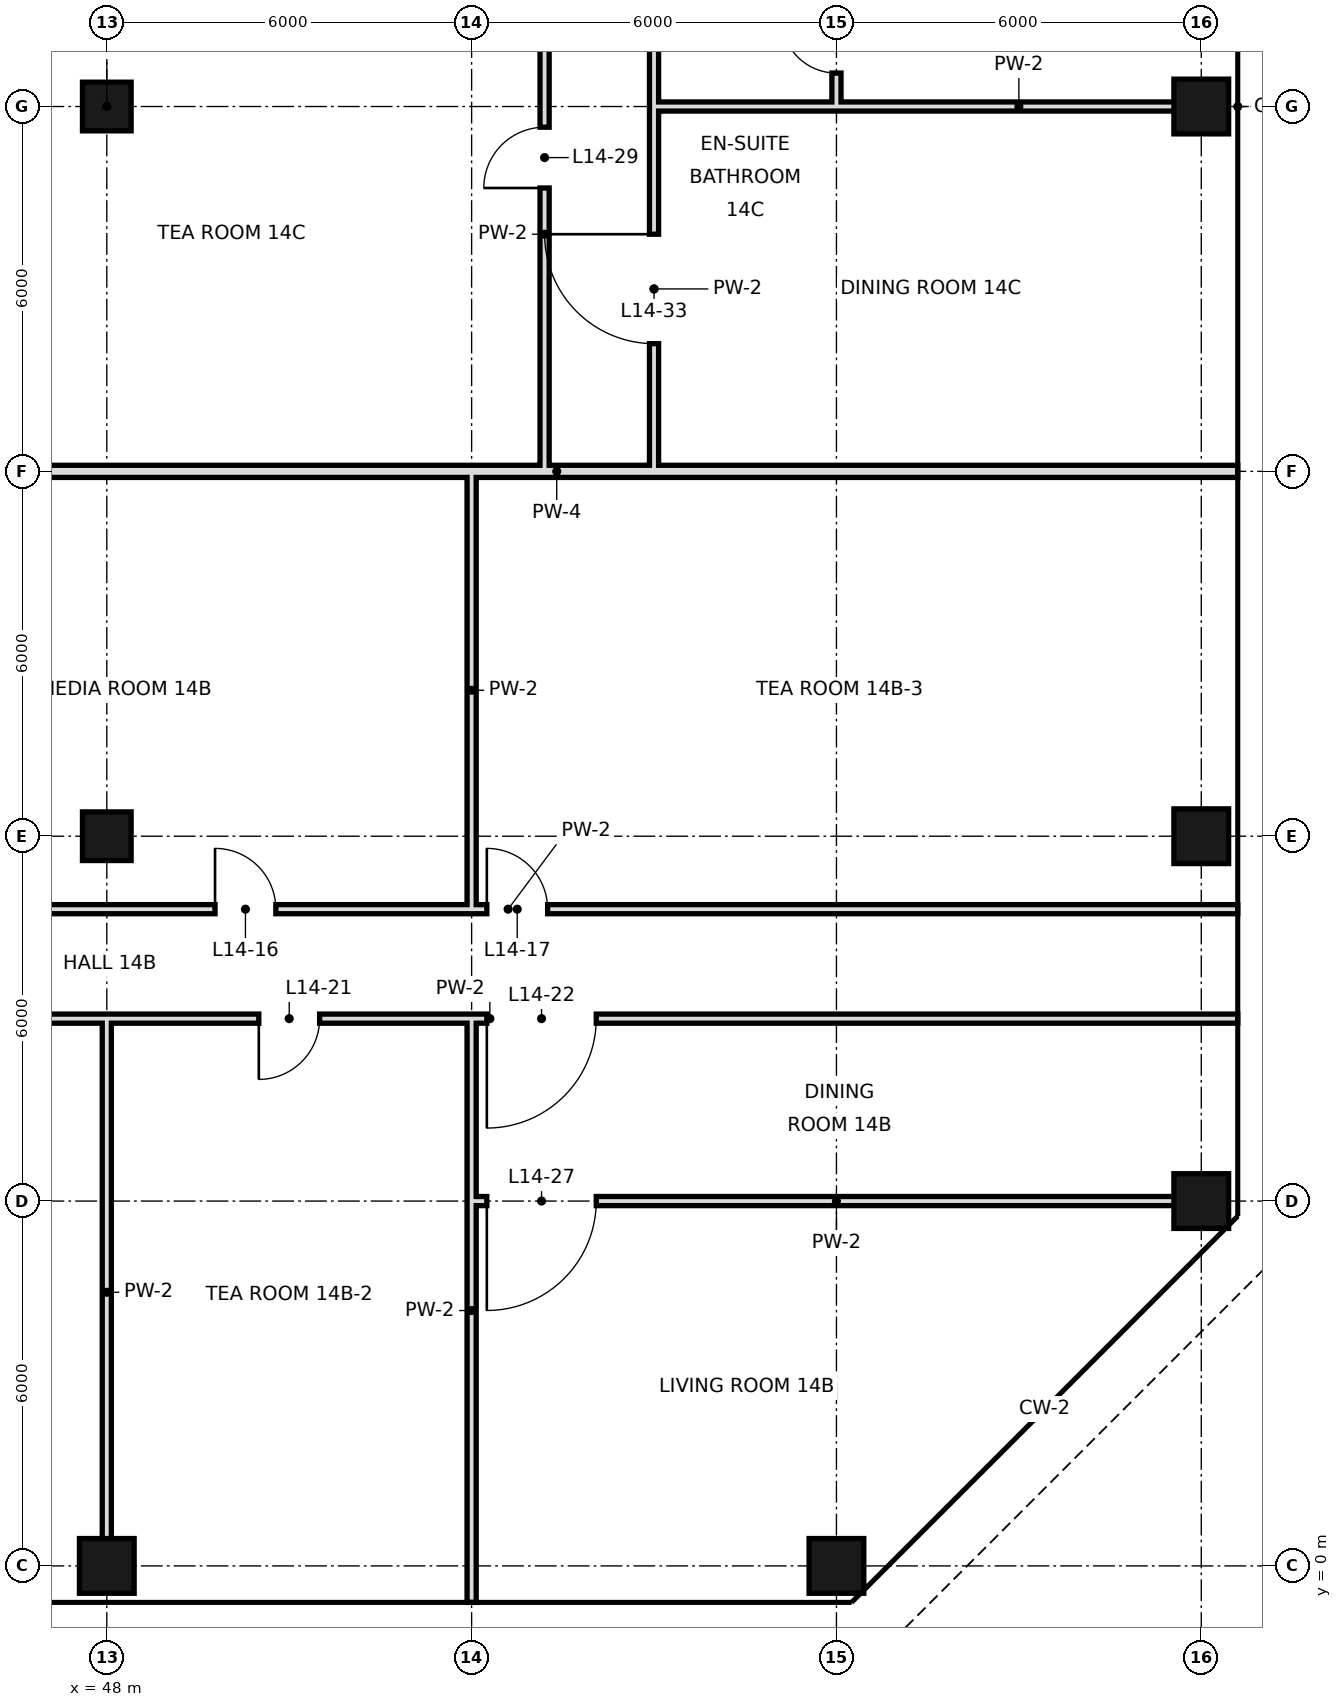
"""IFC4 building model, lengths in metres.
Left out: names, types, materials, properties, quantities, classifications, styles, units other than length and angle.
Written with IfcOpenShell. Run it as: python <this file> out.ifc"""

import sys

from ifc_helpers import new_model, si_unit, direction, frame, frame_2d, origin, origin_2d, place, context, subcontext, project, spatial, rectangle, hollow_rectangle, extrude, element, fill, save


model = new_model("IFC4")
c1 = context("Model", 3, precision=1e-05, world=origin(), true_north=direction((0.0, 1.0)))
c2 = subcontext(c1, "Body", "Model", "MODEL_VIEW")
j1 = project(units=[si_unit("LENGTHUNIT", "METRE"), si_unit("PLANEANGLEUNIT", "RADIAN")], contexts=[c1])
p1 = place(None, origin())
s1 = spatial("IfcSite", under=j1, at=p1, CompositionType="ELEMENT")
p2 = place(p1, origin())
s2 = spatial("IfcBuilding", under=s1, at=p2, CompositionType="ELEMENT")
p3 = place(p2, frame((0.0, 0.0, 71.4)))
s3 = spatial("IfcBuildingStorey", under=s2, at=p3, CompositionType="ELEMENT", Elevation=71.4)
p4 = place(p3, frame((48.0, 0.0, 0.0), z_axis=(0.0, 0.0, 1.0), x_axis=(1.0, 0.0, 0.0)))
e1 = element("IfcColumn", 1, at=p4, inside=s3, PredefinedType="COLUMN", context=c2, shape_type="SweptSolid", body=[
    extrude(hollow_rectangle(XDim=0.9, YDim=0.9, WallThickness=0.045, at=origin_2d()), origin(), (0.0, 0.0, 1.0), 3.6),
])
for number, where, z_axis, x_axis in (
    (2, (48.0, 12.0, 0.0), (0.0, 0.0, 1.0), (1.0, 0.0, 0.0)),
    (3, (48.0, 24.0, 0.0), (0.0, 0.0, 1.0), (1.0, 0.0, 0.0)),
):
    element("IfcColumn", number, at=place(p3, frame(where, z_axis=z_axis, x_axis=x_axis)), inside=s3, PredefinedType="COLUMN", context=c2, shape_type="SweptSolid", body=[
        extrude(hollow_rectangle(XDim=0.8, YDim=0.8, WallThickness=0.04, at=origin_2d()), origin(), (0.0, 0.0, 1.0), 3.6),
    ])
for number, where, z_axis, x_axis in (
    (4, (60.0, 0.0, 0.0), (0.0, 0.0, 1.0), (1.0, 0.0, 0.0)),
    (5, (66.0, 6.0, 0.0), (0.0, 0.0, 1.0), (1.0, 0.0, 0.0)),
    (6, (66.0, 12.0, 0.0), (0.0, 0.0, 1.0), (1.0, 0.0, 0.0)),
    (7, (66.0, 24.0, 0.0), (0.0, 0.0, 1.0), (1.0, 0.0, 0.0)),
):
    element("IfcColumn", number, at=place(p3, frame(where, z_axis=z_axis, x_axis=x_axis)), inside=s3, PredefinedType="COLUMN", context=c2, shape_type="SweptSolid", body=[
        extrude(hollow_rectangle(XDim=0.9, YDim=0.9, WallThickness=0.045, at=origin_2d()), origin(), (0.0, 0.0, 1.0), 3.6),
    ])
p5 = place(p3, frame((48.0, 0.0, 0.0), z_axis=(0.0, 0.0, 1.0), x_axis=(0.0, 1.0, 0.0)))
e8 = element("IfcWall", 8, at=p5, inside=s3, PredefinedType="PARTITIONING", context=c2, shape_type="SweptSolid", body=[
    extrude(rectangle(XDim=9.0, YDim=0.15, at=frame_2d((4.5, 0.0))), origin(), (0.0, 0.0, 1.0), 2.72),
])
p6 = place(p3, frame((54.0, -0.6, 0.0), z_axis=(0.0, 0.0, 1.0), x_axis=(0.0, 1.0, 0.0)))
e9 = element("IfcWall", 9, at=p6, inside=s3, PredefinedType="PARTITIONING", context=c2, shape_type="SweptSolid", body=[
    extrude(rectangle(XDim=9.6, YDim=0.15, at=frame_2d((4.8, 0.0))), origin(), (0.0, 0.0, 1.0), 3.42),
])
p7 = place(p3, frame((54.0, 10.8, 0.0), z_axis=(0.0, 0.0, 1.0), x_axis=(0.0, 1.0, 0.0)))
e10 = element("IfcWall", 10, at=p7, inside=s3, PredefinedType="PARTITIONING", context=c2, shape_type="SweptSolid", body=[
    extrude(rectangle(XDim=7.2, YDim=0.15, at=frame_2d((3.6, 0.0))), origin(), (0.0, 0.0, 1.0), 3.42),
])
p8 = place(p3, frame((55.2, 18.0, 0.0), z_axis=(0.0, 0.0, 1.0), x_axis=(0.0, 1.0, 0.0)))
e11 = element("IfcWall", 11, at=p8, inside=s3, PredefinedType="PARTITIONING", context=c2, shape_type="SweptSolid", body=[
    extrude(rectangle(XDim=7.8, YDim=0.15, at=frame_2d((3.9, 0.0))), origin(), (0.0, 0.0, 1.0), 3.42),
])
p9 = place(p8, frame((4.66, 0.0, 0.0)))
e12 = element("IfcOpeningElement", 12, at=p9, cuts=e11, PredefinedType="OPENING", context=c2, shape_type="SweptSolid", body=[
    extrude(rectangle(XDim=1.0, YDim=2.4, at=frame_2d((0.5, 1.2))), frame((0.0, 0.085, 0.0), z_axis=(0.0, -1.0, 0.0), x_axis=(1.0, 0.0, 0.0)), (0.0, 0.0, 1.0), 0.17),
])
p10 = place(p3, frame((57.0, 18.0, 0.0), z_axis=(0.0, 0.0, 1.0), x_axis=(0.0, 1.0, 0.0)))
e13 = element("IfcWall", 13, at=p10, inside=s3, PredefinedType="PARTITIONING", context=c2, shape_type="SweptSolid", body=[
    extrude(rectangle(XDim=6.0, YDim=0.15, at=frame_2d((3.0, 0.0))), origin(), (0.0, 0.0, 1.0), 3.42),
])
p11 = place(p10, frame((2.1, 0.0, 0.0)))
e14 = element("IfcOpeningElement", 14, at=p11, cuts=e13, PredefinedType="OPENING", context=c2, shape_type="SweptSolid", body=[
    extrude(rectangle(XDim=1.8, YDim=2.4, at=frame_2d((0.9, 1.2))), frame((0.0, 0.085, 0.0), z_axis=(0.0, -1.0, 0.0), x_axis=(1.0, 0.0, 0.0)), (0.0, 0.0, 1.0), 0.17),
])
p12 = place(p3, frame((57.0, 24.0, 0.0), z_axis=(0.0, 0.0, 1.0), x_axis=(0.0, 1.0, 0.0)))
e15 = element("IfcWall", 15, at=p12, inside=s3, PredefinedType="PARTITIONING", context=c2, shape_type="SweptSolid", body=[
    extrude(rectangle(XDim=2.4, YDim=0.15, at=frame_2d((1.2, 0.0))), origin(), (0.0, 0.0, 1.0), 3.42),
])
p13 = place(p3, frame((60.0, 24.0, 0.0), z_axis=(0.0, 0.0, 1.0), x_axis=(0.0, 1.0, 0.0)))
e16 = element("IfcWall", 16, at=p13, inside=s3, PredefinedType="PARTITIONING", context=c2, shape_type="SweptSolid", body=[
    extrude(rectangle(XDim=2.4, YDim=0.15, at=frame_2d((1.2, 0.0))), origin(), (0.0, 0.0, 1.0), 3.42),
])
p14 = place(p13, frame((0.55, 0.0, 0.0)))
e17 = element("IfcOpeningElement", 17, at=p14, cuts=e16, PredefinedType="OPENING", context=c2, shape_type="SweptSolid", body=[
    extrude(rectangle(XDim=0.9, YDim=2.4, at=frame_2d((0.45, 1.2))), frame((0.0, 0.085, 0.0), z_axis=(0.0, -1.0, 0.0), x_axis=(1.0, 0.0, 0.0)), (0.0, 0.0, 1.0), 0.17),
])
p15 = place(p3, frame((42.6, 10.8, 0.0), z_axis=(0.0, 0.0, 1.0), x_axis=(1.0, 0.0, 0.0)))
e18 = element("IfcWall", 18, at=p15, inside=s3, PredefinedType="PARTITIONING", context=c2, shape_type="SweptSolid", body=[
    extrude(rectangle(XDim=24.0, YDim=0.15, at=frame_2d((12.0, 0.0))), origin(), (0.0, 0.0, 1.0), 3.42),
])
p16 = place(p15, frame((7.18, 0.0, 0.0)))
e19 = element("IfcOpeningElement", 19, at=p16, cuts=e18, PredefinedType="OPENING", context=c2, shape_type="SweptSolid", body=[
    extrude(rectangle(XDim=1.0, YDim=2.4, at=frame_2d((0.5, 1.2))), frame((0.0, 0.085, 0.0), z_axis=(0.0, -1.0, 0.0), x_axis=(1.0, 0.0, 0.0)), (0.0, 0.0, 1.0), 0.17),
])
p17 = place(p15, frame((11.65, 0.0, 0.0)))
e20 = element("IfcOpeningElement", 20, at=p17, cuts=e18, PredefinedType="OPENING", context=c2, shape_type="SweptSolid", body=[
    extrude(rectangle(XDim=1.0, YDim=2.4, at=frame_2d((0.5, 1.2))), frame((0.0, 0.085, 0.0), z_axis=(0.0, -1.0, 0.0), x_axis=(1.0, 0.0, 0.0)), (0.0, 0.0, 1.0), 0.17),
])
p18 = place(p3, frame((44.9, 18.0, 0.0), z_axis=(0.0, 0.0, 1.0), x_axis=(1.0, 0.0, 0.0)))
e21 = element("IfcWall", 21, at=p18, inside=s3, PredefinedType="SOLIDWALL", context=c2, shape_type="SweptSolid", body=[
    extrude(rectangle(XDim=21.7, YDim=0.2, at=frame_2d((10.85, 0.0))), origin(), (0.0, 0.0, 1.0), 2.52),
])
p19 = place(p3, frame((60.0, 24.0, 0.0), z_axis=(0.0, 0.0, 1.0), x_axis=(1.0, 0.0, 0.0)))
e22 = element("IfcWall", 22, at=p19, inside=s3, PredefinedType="PARTITIONING", context=c2, shape_type="SweptSolid", body=[
    extrude(rectangle(XDim=6.0, YDim=0.15, at=frame_2d((3.0, 0.0))), origin(), (0.0, 0.0, 1.0), 2.52),
])
p20 = place(p3, frame((57.0, 24.0, 0.0), z_axis=(0.0, 0.0, 1.0), x_axis=(1.0, 0.0, 0.0)))
e23 = element("IfcWall", 23, at=p20, inside=s3, PredefinedType="PARTITIONING", context=c2, shape_type="SweptSolid", body=[
    extrude(rectangle(XDim=3.0, YDim=0.15, at=frame_2d((1.5, 0.0))), origin(), (0.0, 0.0, 1.0), 2.52),
])
p21 = place(p3, frame((54.0, 6.0, 0.0), z_axis=(0.0, 0.0, 1.0), x_axis=(1.0, 0.0, 0.0)))
e24 = element("IfcWall", 24, at=p21, inside=s3, PredefinedType="PARTITIONING", context=c2, shape_type="SweptSolid", body=[
    extrude(rectangle(XDim=12.0, YDim=0.15, at=frame_2d((6.0, 0.0))), origin(), (0.0, 0.0, 1.0), 2.52),
])
p22 = place(p21, frame((0.25, 0.0, 0.0)))
e25 = element("IfcOpeningElement", 25, at=p22, cuts=e24, PredefinedType="OPENING", context=c2, shape_type="SweptSolid", body=[
    extrude(rectangle(XDim=1.8, YDim=2.4, at=frame_2d((0.9, 1.2))), frame((0.0, 0.085, 0.0), z_axis=(0.0, -1.0, 0.0), x_axis=(1.0, 0.0, 0.0)), (0.0, 0.0, 1.0), 0.17),
])
p23 = place(p3, frame((42.0, 9.0, 0.0), z_axis=(0.0, 0.0, 1.0), x_axis=(1.0, 0.0, 0.0)))
e26 = element("IfcWall", 26, at=p23, inside=s3, PredefinedType="PARTITIONING", context=c2, shape_type="SweptSolid", body=[
    extrude(rectangle(XDim=24.6, YDim=0.15, at=frame_2d((12.3, 0.0))), origin(), (0.0, 0.0, 1.0), 3.42),
])
p24 = place(p23, frame((1.6, 0.0, 0.0)))
e27 = element("IfcOpeningElement", 27, at=p24, cuts=e26, PredefinedType="OPENING", context=c2, shape_type="SweptSolid", body=[
    extrude(rectangle(XDim=1.0, YDim=2.4, at=frame_2d((0.5, 1.2))), frame((0.0, 0.085, 0.0), z_axis=(0.0, -1.0, 0.0), x_axis=(1.0, 0.0, 0.0)), (0.0, 0.0, 1.0), 0.17),
])
p25 = place(p23, frame((8.5, 0.0, 0.0)))
e28 = element("IfcOpeningElement", 28, at=p25, cuts=e26, PredefinedType="OPENING", context=c2, shape_type="SweptSolid", body=[
    extrude(rectangle(XDim=1.0, YDim=2.4, at=frame_2d((0.5, 1.2))), frame((0.0, 0.085, 0.0), z_axis=(0.0, -1.0, 0.0), x_axis=(1.0, 0.0, 0.0)), (0.0, 0.0, 1.0), 0.17),
])
p26 = place(p23, frame((12.25, 0.0, 0.0)))
e29 = element("IfcOpeningElement", 29, at=p26, cuts=e26, PredefinedType="OPENING", context=c2, shape_type="SweptSolid", body=[
    extrude(rectangle(XDim=1.8, YDim=2.4, at=frame_2d((0.9, 1.2))), frame((0.0, 0.085, 0.0), z_axis=(0.0, -1.0, 0.0), x_axis=(1.0, 0.0, 0.0)), (0.0, 0.0, 1.0), 0.17),
])
p27 = place(p16, origin())
e30 = element("IfcDoor", 30, at=p27, inside=s3, OperationType="SINGLE_SWING_LEFT", PredefinedType="DOOR", context=c2, shape_type="SweptSolid", body=[
    extrude(rectangle(XDim=1.0, YDim=2.4, at=frame_2d((0.5, 1.2))), frame((0.0, 0.025, 0.0), z_axis=(0.0, -1.0, 0.0), x_axis=(1.0, 0.0, 0.0)), (0.0, 0.0, 1.0), 0.05),
])
fill(e19, e30)
p28 = place(p17, origin())
e31 = element("IfcDoor", 31, at=p28, inside=s3, OperationType="SINGLE_SWING_LEFT", PredefinedType="DOOR", context=c2, shape_type="SweptSolid", body=[
    extrude(rectangle(XDim=1.0, YDim=2.4, at=frame_2d((0.5, 1.2))), frame((0.0, 0.025, 0.0), z_axis=(0.0, -1.0, 0.0), x_axis=(1.0, 0.0, 0.0)), (0.0, 0.0, 1.0), 0.05),
])
fill(e20, e31)
p29 = place(p25, frame((1.0, 0.0, 0.0), z_axis=(0.0, 0.0, 1.0), x_axis=(-1.0, 0.0, 0.0)))
e32 = element("IfcDoor", 32, at=p29, inside=s3, OperationType="SINGLE_SWING_RIGHT", PredefinedType="DOOR", context=c2, shape_type="SweptSolid", body=[
    extrude(rectangle(XDim=1.0, YDim=2.4, at=frame_2d((0.5, 1.2))), frame((0.0, 0.025, 0.0), z_axis=(0.0, -1.0, 0.0), x_axis=(1.0, 0.0, 0.0)), (0.0, 0.0, 1.0), 0.05),
])
fill(e28, e32)
p30 = place(p26, frame((1.8, 0.0, 0.0), z_axis=(0.0, 0.0, 1.0), x_axis=(-1.0, 0.0, 0.0)))
e33 = element("IfcDoor", 33, at=p30, inside=s3, OperationType="SINGLE_SWING_RIGHT", PredefinedType="DOOR", context=c2, shape_type="SweptSolid", body=[
    extrude(rectangle(XDim=1.8, YDim=2.4, at=frame_2d((0.9, 1.2))), frame((0.0, 0.025, 0.0), z_axis=(0.0, -1.0, 0.0), x_axis=(1.0, 0.0, 0.0)), (0.0, 0.0, 1.0), 0.05),
])
fill(e29, e33)
p31 = place(p22, frame((1.8, 0.0, 0.0), z_axis=(0.0, 0.0, 1.0), x_axis=(-1.0, 0.0, 0.0)))
e34 = element("IfcDoor", 34, at=p31, inside=s3, OperationType="SINGLE_SWING_RIGHT", PredefinedType="DOOR", context=c2, shape_type="SweptSolid", body=[
    extrude(rectangle(XDim=1.8, YDim=2.4, at=frame_2d((0.9, 1.2))), frame((0.0, 0.025, 0.0), z_axis=(0.0, -1.0, 0.0), x_axis=(1.0, 0.0, 0.0)), (0.0, 0.0, 1.0), 0.05),
])
fill(e25, e34)
p32 = place(p9, origin())
e35 = element("IfcDoor", 35, at=p32, inside=s3, OperationType="SINGLE_SWING_LEFT", PredefinedType="DOOR", context=c2, shape_type="SweptSolid", body=[
    extrude(rectangle(XDim=1.0, YDim=2.4, at=frame_2d((0.5, 1.2))), frame((0.0, 0.025, 0.0), z_axis=(0.0, -1.0, 0.0), x_axis=(1.0, 0.0, 0.0)), (0.0, 0.0, 1.0), 0.05),
])
fill(e12, e35)
p33 = place(p11, frame((1.8, 0.0, 0.0), z_axis=(0.0, 0.0, 1.0), x_axis=(-1.0, 0.0, 0.0)))
e36 = element("IfcDoor", 36, at=p33, inside=s3, OperationType="SINGLE_SWING_LEFT", PredefinedType="DOOR", context=c2, shape_type="SweptSolid", body=[
    extrude(rectangle(XDim=1.8, YDim=2.4, at=frame_2d((0.9, 1.2))), frame((0.0, 0.025, 0.0), z_axis=(0.0, -1.0, 0.0), x_axis=(1.0, 0.0, 0.0)), (0.0, 0.0, 1.0), 0.05),
])
fill(e14, e36)
p34 = place(p14, frame((0.9, 0.0, 0.0), z_axis=(0.0, 0.0, 1.0), x_axis=(-1.0, 0.0, 0.0)))
e37 = element("IfcDoor", 37, at=p34, inside=s3, OperationType="SINGLE_SWING_LEFT", PredefinedType="DOOR", context=c2, shape_type="SweptSolid", body=[
    extrude(rectangle(XDim=0.9, YDim=2.4, at=frame_2d((0.45, 1.2))), frame((0.0, 0.025, 0.0), z_axis=(0.0, -1.0, 0.0), x_axis=(1.0, 0.0, 0.0)), (0.0, 0.0, 1.0), 0.05),
])
fill(e17, e37)
save(model, sys.argv[1])
